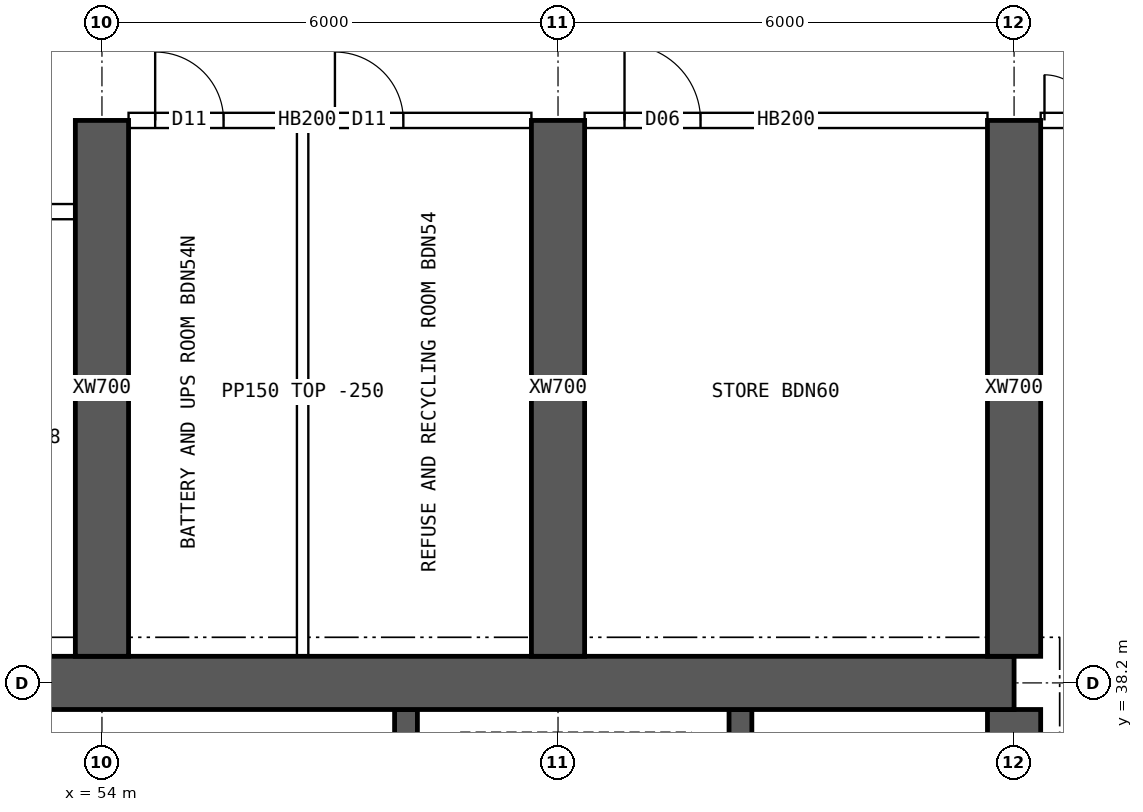
"""IFC4 building model, lengths in metres.
Left out: names, types, materials, properties, quantities, classifications, styles, units other than length and angle.
Written with IfcOpenShell. Run it as: python <this file> out.ifc"""

import sys

from ifc_helpers import new_model, si_unit, direction, frame, frame_2d, origin, place, context, subcontext, project, spatial, rectangle, extrude, element, fill, save


model = new_model("IFC4")
c1 = context("Model", 3, precision=1e-05, world=origin(), true_north=direction((0.0, 1.0)))
c2 = subcontext(c1, "Body", "Model", "MODEL_VIEW")
j1 = project(units=[si_unit("LENGTHUNIT", "METRE"), si_unit("PLANEANGLEUNIT", "RADIAN")], contexts=[c1])
p1 = place(None, origin())
s1 = spatial("IfcSite", under=j1, at=p1, CompositionType="ELEMENT")
p2 = place(p1, origin())
s2 = spatial("IfcBuilding", under=s1, at=p2, CompositionType="ELEMENT")
p3 = place(p2, frame((0.0, 0.0, 250.3)))
s3 = spatial("IfcBuildingStorey", under=s2, at=p3, CompositionType="ELEMENT", Elevation=250.3)
p4 = place(p3, frame((18.0, 38.2, 0.0), z_axis=(0.0, 0.0, 1.0), x_axis=(1.0, 0.0, 0.0)))
e1 = element("IfcWall", 1, at=p4, inside=s3, PredefinedType="SHEAR", context=c2, shape_type="SweptSolid", body=[
    extrude(rectangle(XDim=48.0, YDim=0.7, at=frame_2d((24.0, 0.0))), origin(), (0.0, 0.0, 1.0), 3.75),
])
p5 = place(p3, frame((66.0, 26.15, 0.0), z_axis=(0.0, 0.0, 1.0), x_axis=(0.0, 1.0, 0.0)))
e2 = element("IfcWall", 2, at=p5, inside=s3, PredefinedType="SHEAR", context=c2, shape_type="SweptSolid", body=[
    extrude(rectangle(XDim=11.7, YDim=0.7, at=frame_2d((5.85, 0.0))), origin(), (0.0, 0.0, 1.0), 3.75),
])
p6 = place(p5, frame((5.15, 0.0, 0.0)))
e3 = element("IfcOpeningElement", 3, at=p6, cuts=e2, PredefinedType="OPENING", context=c2, shape_type="SweptSolid", body=[
    extrude(rectangle(XDim=1.2, YDim=2.1, at=frame_2d((0.6, 1.05))), frame((0.0, 0.36, 0.0), z_axis=(0.0, -1.0, 0.0), x_axis=(1.0, 0.0, 0.0)), (0.0, 0.0, 1.0), 0.72),
])
for number, where, z_axis, x_axis in (
    (4, (62.4, 34.75, 0.0), (0.0, 0.0, 1.0), (0.0, 1.0, 0.0)),
    (5, (58.0, 34.75, 0.0), (0.0, 0.0, 1.0), (0.0, 1.0, 0.0)),
):
    element("IfcWall", number, at=place(p3, frame(where, z_axis=z_axis, x_axis=x_axis)), inside=s3, PredefinedType="SHEAR", context=c2, shape_type="SweptSolid", body=[
        extrude(rectangle(XDim=3.1, YDim=0.3, at=frame_2d((1.55, 0.0))), origin(), (0.0, 0.0, 1.0), 3.75),
    ])
for number, where, z_axis, x_axis in (
    (6, (54.0, 38.55, 0.0), (0.0, 0.0, 1.0), (0.0, 1.0, 0.0)),
    (7, (60.0, 38.55, 0.0), (0.0, 0.0, 1.0), (0.0, 1.0, 0.0)),
    (8, (66.0, 38.55, 0.0), (0.0, 0.0, 1.0), (0.0, 1.0, 0.0)),
):
    element("IfcWall", number, at=place(p3, frame(where, z_axis=z_axis, x_axis=x_axis)), inside=s3, PredefinedType="SHEAR", context=c2, shape_type="SweptSolid", body=[
        extrude(rectangle(XDim=7.05, YDim=0.7, at=frame_2d((3.525, 0.0))), origin(), (0.0, 0.0, 1.0), 3.75),
    ])
p7 = place(p3, frame((54.35, 45.6, 0.0), z_axis=(0.0, 0.0, 1.0), x_axis=(1.0, 0.0, 0.0)))
e9 = element("IfcWall", 9, at=p7, inside=s3, PredefinedType="SOLIDWALL", context=c2, shape_type="SweptSolid", body=[
    extrude(rectangle(XDim=5.3, YDim=0.2, at=frame_2d((2.65, 0.0))), origin(), (0.0, 0.0, 1.0), 3.5),
])
p8 = place(p7, frame((0.35, 0.0, 0.0)))
e10 = element("IfcOpeningElement", 10, at=p8, cuts=e9, PredefinedType="OPENING", context=c2, shape_type="SweptSolid", body=[
    extrude(rectangle(XDim=0.9, YDim=2.1, at=frame_2d((0.45, 1.05))), frame((0.0, 0.11, 0.0), z_axis=(0.0, -1.0, 0.0), x_axis=(1.0, 0.0, 0.0)), (0.0, 0.0, 1.0), 0.22),
])
p9 = place(p7, frame((2.715, 0.0, 0.0)))
e11 = element("IfcOpeningElement", 11, at=p9, cuts=e9, PredefinedType="OPENING", context=c2, shape_type="SweptSolid", body=[
    extrude(rectangle(XDim=0.9, YDim=2.1, at=frame_2d((0.45, 1.05))), frame((0.0, 0.11, 0.0), z_axis=(0.0, -1.0, 0.0), x_axis=(1.0, 0.0, 0.0)), (0.0, 0.0, 1.0), 0.22),
])
p10 = place(p3, frame((60.35, 45.6, 0.0), z_axis=(0.0, 0.0, 1.0), x_axis=(1.0, 0.0, 0.0)))
e12 = element("IfcWall", 12, at=p10, inside=s3, PredefinedType="SOLIDWALL", context=c2, shape_type="SweptSolid", body=[
    extrude(rectangle(XDim=5.3, YDim=0.2, at=frame_2d((2.65, 0.0))), origin(), (0.0, 0.0, 1.0), 3.5),
])
p11 = place(p10, frame((0.525, 0.0, 0.0)))
e13 = element("IfcOpeningElement", 13, at=p11, cuts=e12, PredefinedType="OPENING", context=c2, shape_type="SweptSolid", body=[
    extrude(rectangle(XDim=1.0, YDim=2.1, at=frame_2d((0.5, 1.05))), frame((0.0, 0.11, 0.0), z_axis=(0.0, -1.0, 0.0), x_axis=(1.0, 0.0, 0.0)), (0.0, 0.0, 1.0), 0.22),
])
p12 = place(p3, frame((66.35, 45.6, 0.0), z_axis=(0.0, 0.0, 1.0), x_axis=(1.0, 0.0, 0.0)))
e14 = element("IfcWall", 14, at=p12, inside=s3, PredefinedType="SOLIDWALL", context=c2, shape_type="SweptSolid", body=[
    extrude(rectangle(XDim=2.05, YDim=0.2, at=frame_2d((1.025, 0.0))), origin(), (0.0, 0.0, 1.0), 3.5),
])
p13 = place(p12, frame((0.05, 0.0, 0.0)))
e15 = element("IfcOpeningElement", 15, at=p13, cuts=e14, PredefinedType="OPENING", context=c2, shape_type="SweptSolid", body=[
    extrude(rectangle(XDim=1.2, YDim=2.1, at=frame_2d((0.6, 1.05))), frame((0.0, 0.11, 0.0), z_axis=(0.0, -1.0, 0.0), x_axis=(1.0, 0.0, 0.0)), (0.0, 0.0, 1.0), 0.22),
])
p14 = place(p3, frame((48.35, 44.4, 0.0), z_axis=(0.0, 0.0, 1.0), x_axis=(1.0, 0.0, 0.0)))
e16 = element("IfcWall", 16, at=p14, inside=s3, PredefinedType="SOLIDWALL", context=c2, shape_type="SweptSolid", body=[
    extrude(rectangle(XDim=5.3, YDim=0.2, at=frame_2d((2.65, 0.0))), origin(), (0.0, 0.0, 1.0), 3.5),
])
p15 = place(p14, frame((0.525, 0.0, 0.0)))
e17 = element("IfcOpeningElement", 17, at=p15, cuts=e16, PredefinedType="OPENING", context=c2, shape_type="SweptSolid", body=[
    extrude(rectangle(XDim=1.0, YDim=2.1, at=frame_2d((0.5, 1.05))), frame((0.0, 0.11, 0.0), z_axis=(0.0, -1.0, 0.0), x_axis=(1.0, 0.0, 0.0)), (0.0, 0.0, 1.0), 0.22),
])
p16 = place(p3, frame((56.64, 38.55, 0.0), z_axis=(0.0, 0.0, 1.0), x_axis=(0.0, 1.0, 0.0)))
e18 = element("IfcWall", 18, at=p16, inside=s3, PredefinedType="PARTITIONING", context=c2, shape_type="SweptSolid", body=[
    extrude(rectangle(XDim=6.95, YDim=0.15, at=frame_2d((3.475, 0.0))), origin(), (0.0, 0.0, 1.0), 3.5),
])
p17 = place(p13, origin())
e19 = element("IfcDoor", 19, at=p17, inside=s3, OperationType="DOUBLE_DOOR_SINGLE_SWING", PredefinedType="DOOR", context=c2, shape_type="SweptSolid", body=[
    extrude(rectangle(XDim=1.2, YDim=2.1, at=frame_2d((0.6, 1.05))), frame((0.0, 0.025, 0.0), z_axis=(0.0, -1.0, 0.0), x_axis=(1.0, 0.0, 0.0)), (0.0, 0.0, 1.0), 0.05),
])
fill(e15, e19)
p18 = place(p8, origin())
e20 = element("IfcDoor", 20, at=p18, inside=s3, OperationType="SINGLE_SWING_LEFT", PredefinedType="DOOR", context=c2, shape_type="SweptSolid", body=[
    extrude(rectangle(XDim=0.9, YDim=2.1, at=frame_2d((0.45, 1.05))), frame((0.0, 0.025, 0.0), z_axis=(0.0, -1.0, 0.0), x_axis=(1.0, 0.0, 0.0)), (0.0, 0.0, 1.0), 0.05),
])
fill(e10, e20)
p19 = place(p9, origin())
e21 = element("IfcDoor", 21, at=p19, inside=s3, OperationType="SINGLE_SWING_LEFT", PredefinedType="DOOR", context=c2, shape_type="SweptSolid", body=[
    extrude(rectangle(XDim=0.9, YDim=2.1, at=frame_2d((0.45, 1.05))), frame((0.0, 0.025, 0.0), z_axis=(0.0, -1.0, 0.0), x_axis=(1.0, 0.0, 0.0)), (0.0, 0.0, 1.0), 0.05),
])
fill(e11, e21)
p20 = place(p11, origin())
e22 = element("IfcDoor", 22, at=p20, inside=s3, OperationType="SINGLE_SWING_LEFT", PredefinedType="DOOR", context=c2, shape_type="SweptSolid", body=[
    extrude(rectangle(XDim=1.0, YDim=2.1, at=frame_2d((0.5, 1.05))), frame((0.0, 0.025, 0.0), z_axis=(0.0, -1.0, 0.0), x_axis=(1.0, 0.0, 0.0)), (0.0, 0.0, 1.0), 0.05),
])
fill(e13, e22)
save(model, sys.argv[1])
